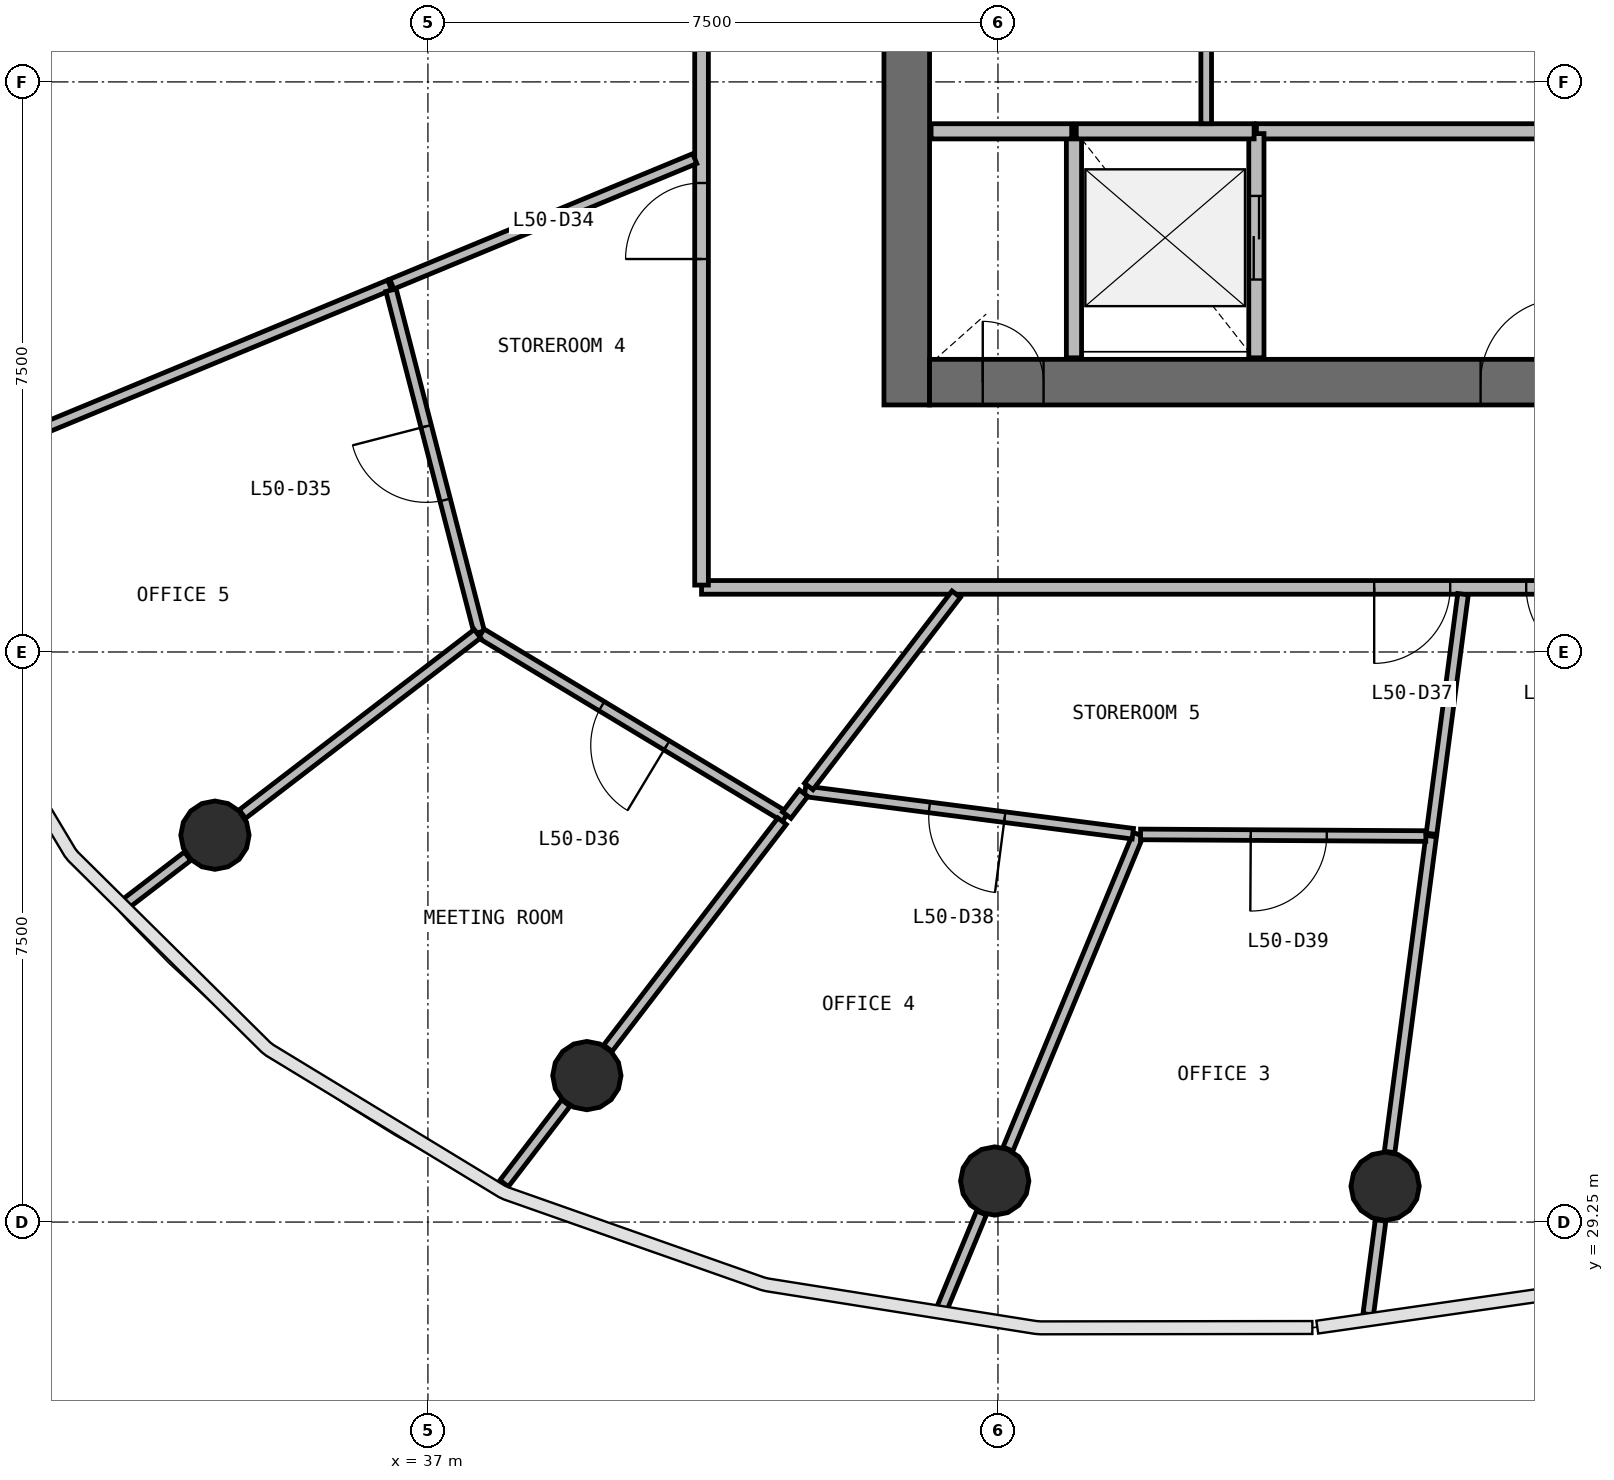
"""IFC4 building model, lengths in metres.
Left out: names, types, materials, properties, quantities, classifications, styles, units other than length and angle.
Written with IfcOpenShell. Run it as: python <this file> out.ifc"""

import sys

from ifc_helpers import new_model, si_unit, direction, frame, frame_2d, origin, origin_2d, place, context, subcontext, project, spatial, rectangle, circle, extrude, source, transform, mapped, element, fill, save


model = new_model("IFC4")
c1 = context("Model", 3, precision=1e-05, world=origin(), true_north=direction((0.0, 1.0)))
c2 = subcontext(c1, "Body", "Model", "MODEL_VIEW")
j1 = project(units=[si_unit("LENGTHUNIT", "METRE"), si_unit("PLANEANGLEUNIT", "RADIAN")], contexts=[c1])
p1 = place(None, origin())
s1 = spatial("IfcSite", under=j1, at=p1, CompositionType="ELEMENT")
p2 = place(p1, origin())
s2 = spatial("IfcBuilding", under=s1, at=p2, CompositionType="ELEMENT")
p3 = place(p2, frame((0.0, 0.0, 207.2)))
s3 = spatial("IfcBuildingStorey", under=s2, at=p3, CompositionType="ELEMENT", Elevation=207.2)
p4 = place(p3, frame((43.3, 56.0, 0.0), z_axis=(0.0, 0.0, 1.0), x_axis=(0.0, -1.0, 0.0)))
e1 = element("IfcWall", 1, at=p4, inside=s3, PredefinedType="SHEAR", context=c2, shape_type="SweptSolid", body=[
    extrude(rectangle(XDim=16.0, YDim=0.6, at=frame_2d((8.0, 0.0))), origin(), (0.0, 0.0, 1.0), 3.9),
])
p5 = place(p4, frame((7.1, 0.0, 0.0)))
e2 = element("IfcOpeningElement", 2, at=p5, cuts=e1, PredefinedType="OPENING", context=c2, shape_type="SweptSolid", body=[
    extrude(rectangle(XDim=1.8, YDim=2.1, at=frame_2d((0.9, 1.05))), frame((0.0, 0.31, 0.0), z_axis=(0.0, -1.0, 0.0), x_axis=(1.0, 0.0, 0.0)), (0.0, 0.0, 1.0), 0.62),
])
p6 = place(p3, frame((43.6, 40.3, 0.0), z_axis=(0.0, 0.0, 1.0), x_axis=(1.0, 0.0, 0.0)))
e3 = element("IfcWall", 3, at=p6, inside=s3, PredefinedType="SHEAR", context=c2, shape_type="SweptSolid", body=[
    extrude(rectangle(XDim=16.8, YDim=0.6, at=frame_2d((8.4, 0.0))), origin(), (0.0, 0.0, 1.0), 3.9),
])
p7 = place(p6, frame((10.3, 0.0, 0.0)))
e4 = element("IfcOpeningElement", 4, at=p7, cuts=e3, PredefinedType="OPENING", context=c2, shape_type="SweptSolid", body=[
    extrude(rectangle(XDim=1.2, YDim=2.1, at=frame_2d((0.6, 1.05))), frame((0.0, 0.31, 0.0), z_axis=(0.0, -1.0, 0.0), x_axis=(1.0, 0.0, 0.0)), (0.0, 0.0, 1.0), 0.62),
])
p8 = place(p6, frame((7.25, 0.0, 0.0)))
e5 = element("IfcOpeningElement", 5, at=p8, cuts=e3, PredefinedType="OPENING", context=c2, shape_type="SweptSolid", body=[
    extrude(rectangle(XDim=1.1, YDim=2.1, at=frame_2d((0.55, 1.05))), frame((0.0, 0.31, 0.0), z_axis=(0.0, -1.0, 0.0), x_axis=(1.0, 0.0, 0.0)), (0.0, 0.0, 1.0), 0.62),
])
p9 = place(p6, frame((0.7, 0.0, 0.0)))
e6 = element("IfcOpeningElement", 6, at=p9, cuts=e3, PredefinedType="OPENING", context=c2, shape_type="SweptSolid", body=[
    extrude(rectangle(XDim=0.8, YDim=2.1, at=frame_2d((0.4, 1.05))), frame((0.0, 0.31, 0.0), z_axis=(0.0, -1.0, 0.0), x_axis=(1.0, 0.0, 0.0)), (0.0, 0.0, 1.0), 0.62),
])
m1 = source(origin(), c2, "Body", "SweptSolid", [
    extrude(circle(Radius=0.45, at=origin_2d()), origin(), (0.0, 0.0, 1.0), 3.9),
])
for number, where, z_axis, x_axis in (
    (7, (34.198, 34.34, 0.0), (0.0, 0.0, 1.0), (1.0, 0.0, 0.0)),
    (8, (39.091, 31.177, 0.0), (0.0, 0.0, 1.0), (1.0, 0.0, 0.0)),
    (9, (44.457, 29.79, 0.0), (0.0, 0.0, 1.0), (1.0, 0.0, 0.0)),
    (10, (49.594, 29.722, 0.0), (0.0, 0.0, 1.0), (1.0, 0.0, 0.0)),
):
    element("IfcColumn", number, at=place(p3, frame(where, z_axis=z_axis, x_axis=x_axis)), inside=s3, PredefinedType="COLUMN", context=c2, shape_type="MappedRepresentation", body=[
        mapped(m1, transform((0.0, 0.0, 0.0), scale=1.0)),
    ])
p10 = place(p3, frame((52.7, 43.6, 0.0), z_axis=(0.0, 0.0, 1.0), x_axis=(-1.0, 0.0, 0.0)))
e11 = element("IfcWall", 11, at=p10, inside=s3, PredefinedType="SOLIDWALL", context=c2, shape_type="SweptSolid", body=[
    extrude(rectangle(XDim=4.8, YDim=0.2, at=frame_2d((2.4, 0.0))), origin(), (0.0, 0.0, 1.0), 3.58),
])
p11 = place(p3, frame((45.5, 43.6, 0.0), z_axis=(0.0, 0.0, 1.0), x_axis=(0.0, -1.0, 0.0)))
e12 = element("IfcWall", 12, at=p11, inside=s3, PredefinedType="SOLIDWALL", context=c2, shape_type="SweptSolid", body=[
    extrude(rectangle(XDim=2.98, YDim=0.2, at=frame_2d((1.49, 0.0))), origin(), (0.0, 0.0, 1.0), 3.58),
])
p12 = place(p3, frame((47.9, 40.62, 0.0), z_axis=(0.0, 0.0, 1.0), x_axis=(0.0, 1.0, 0.0)))
e13 = element("IfcWall", 13, at=p12, inside=s3, PredefinedType="SOLIDWALL", context=c2, shape_type="SweptSolid", body=[
    extrude(rectangle(XDim=2.95, YDim=0.2, at=frame_2d((1.475, 0.0))), origin(), (0.0, 0.0, 1.0), 3.58),
])
p13 = place(p12, frame((1.03, 0.0, 0.0)))
e14 = element("IfcOpeningElement", 14, at=p13, cuts=e13, PredefinedType="OPENING", context=c2, shape_type="SweptSolid", body=[
    extrude(rectangle(XDim=1.1, YDim=2.1, at=frame_2d((0.55, 1.05))), frame((0.0, 0.11, 0.0), z_axis=(0.0, -1.0, 0.0), x_axis=(1.0, 0.0, 0.0)), (0.0, 0.0, 1.0), 0.22),
])
p14 = place(p3, frame((47.87, 43.6, 0.0), z_axis=(0.0, 0.0, 1.0), x_axis=(-1.0, 0.0, 0.0)))
e15 = element("IfcWall", 15, at=p14, inside=s3, PredefinedType="SOLIDWALL", context=c2, shape_type="SweptSolid", body=[
    extrude(rectangle(XDim=2.34, YDim=0.2, at=frame_2d((1.17, 0.0))), origin(), (0.0, 0.0, 1.0), 3.58),
])
p15 = place(p3, frame((45.47, 43.6, 0.0), z_axis=(0.0, 0.0, 1.0), x_axis=(-1.0, 0.0, 0.0)))
e16 = element("IfcWall", 16, at=p15, inside=s3, PredefinedType="SOLIDWALL", context=c2, shape_type="SweptSolid", body=[
    extrude(rectangle(XDim=1.85, YDim=0.2, at=frame_2d((0.925, 0.0))), origin(), (0.0, 0.0, 1.0), 3.58),
])
p16 = place(p3, frame((63.4, 37.6, 0.0), z_axis=(0.0, 0.0, 1.0), x_axis=(-1.0, 0.0, 0.0)))
e17 = element("IfcWall", 17, at=p16, inside=s3, PredefinedType="PARTITIONING", context=c2, shape_type="SweptSolid", body=[
    extrude(rectangle(XDim=22.8, YDim=0.18, at=frame_2d((11.4, 0.0))), origin(), (0.0, 0.0, 1.0), 2.88),
])
p17 = place(p16, frame((12.95, 0.0, 0.0)))
e18 = element("IfcOpeningElement", 18, at=p17, cuts=e17, PredefinedType="OPENING", context=c2, shape_type="SweptSolid", body=[
    extrude(rectangle(XDim=1.0, YDim=2.1, at=frame_2d((0.5, 1.05))), frame((0.0, 0.1, 0.0), z_axis=(0.0, -1.0, 0.0), x_axis=(1.0, 0.0, 0.0)), (0.0, 0.0, 1.0), 0.2),
])
p18 = place(p16, frame((10.95, 0.0, 0.0)))
e19 = element("IfcOpeningElement", 19, at=p18, cuts=e17, PredefinedType="OPENING", context=c2, shape_type="SweptSolid", body=[
    extrude(rectangle(XDim=1.0, YDim=2.1, at=frame_2d((0.5, 1.05))), frame((0.0, 0.1, 0.0), z_axis=(0.0, -1.0, 0.0), x_axis=(1.0, 0.0, 0.0)), (0.0, 0.0, 1.0), 0.2),
])
p19 = place(p16, frame((5.75, 0.0, 0.0)))
e20 = element("IfcOpeningElement", 20, at=p19, cuts=e17, PredefinedType="OPENING", context=c2, shape_type="SweptSolid", body=[
    extrude(rectangle(XDim=1.0, YDim=2.1, at=frame_2d((0.5, 1.05))), frame((0.0, 0.1, 0.0), z_axis=(0.0, -1.0, 0.0), x_axis=(1.0, 0.0, 0.0)), (0.0, 0.0, 1.0), 0.2),
])
p20 = place(p3, frame((40.6, 37.63, 0.0), z_axis=(0.0, 0.0, 1.0), x_axis=(0.0, 1.0, 0.0)))
e21 = element("IfcWall", 21, at=p20, inside=s3, PredefinedType="PARTITIONING", context=c2, shape_type="SweptSolid", body=[
    extrude(rectangle(XDim=20.74, YDim=0.18, at=frame_2d((10.37, 0.0))), origin(), (0.0, 0.0, 1.0), 2.88),
])
p21 = place(p20, frame((9.89, 0.0, 0.0)))
e22 = element("IfcOpeningElement", 22, at=p21, cuts=e21, PredefinedType="OPENING", context=c2, shape_type="SweptSolid", body=[
    extrude(rectangle(XDim=1.0, YDim=2.1, at=frame_2d((0.5, 1.05))), frame((0.0, 0.1, 0.0), z_axis=(0.0, -1.0, 0.0), x_axis=(1.0, 0.0, 0.0)), (0.0, 0.0, 1.0), 0.2),
])
p22 = place(p20, frame((4.29, 0.0, 0.0)))
e23 = element("IfcOpeningElement", 23, at=p22, cuts=e21, PredefinedType="OPENING", context=c2, shape_type="SweptSolid", body=[
    extrude(rectangle(XDim=1.0, YDim=2.1, at=frame_2d((0.5, 1.05))), frame((0.0, 0.1, 0.0), z_axis=(0.0, -1.0, 0.0), x_axis=(1.0, 0.0, 0.0)), (0.0, 0.0, 1.0), 0.2),
])
p23 = place(p3, frame((36.497, 41.578, 0.0), z_axis=(0.0, 0.0, 1.0), x_axis=(-0.923872241602, -0.382701033703, 0.0)))
e24 = element("IfcWall", 24, at=p23, inside=s3, PredefinedType="PARTITIONING", context=c2, shape_type="SweptSolid", body=[
    extrude(rectangle(XDim=5.227, YDim=0.14, at=frame_2d((2.614, 0.0))), origin(), (0.0, 0.0, 1.0), 2.88),
])
p24 = place(p3, frame((37.676, 37.009, 0.0), z_axis=(0.0, 0.0, 1.0), x_axis=(-0.249819251726, 0.968292487561, 0.0)))
e25 = element("IfcWall", 25, at=p24, inside=s3, PredefinedType="PARTITIONING", context=c2, shape_type="SweptSolid", body=[
    extrude(rectangle(XDim=4.649, YDim=0.14, at=frame_2d((2.324, 0.0))), origin(), (0.0, 0.0, 1.0), 2.88),
])
p25 = place(p24, frame((1.799, 0.0, 0.0)))
e26 = element("IfcOpeningElement", 26, at=p25, cuts=e25, PredefinedType="OPENING", context=c2, shape_type="SweptSolid", body=[
    extrude(rectangle(XDim=1.0, YDim=2.1, at=frame_2d((0.5, 1.05))), frame((0.0, 0.08, 0.0), z_axis=(0.0, -1.0, 0.0), x_axis=(1.0, 0.0, 0.0)), (0.0, 0.0, 1.0), 0.16),
])
p26 = place(p3, frame((41.702, 34.58, 0.0), z_axis=(0.0, 0.0, 1.0), x_axis=(-0.856310382511, 0.516461546298, 0.0)))
e27 = element("IfcWall", 27, at=p26, inside=s3, PredefinedType="PARTITIONING", context=c2, shape_type="SweptSolid", body=[
    extrude(rectangle(XDim=4.672, YDim=0.14, at=frame_2d((2.336, 0.0))), origin(), (0.0, 0.0, 1.0), 2.88),
])
p27 = place(p26, frame((1.823, 0.0, 0.0)))
e28 = element("IfcOpeningElement", 28, at=p27, cuts=e27, PredefinedType="OPENING", context=c2, shape_type="SweptSolid", body=[
    extrude(rectangle(XDim=1.0, YDim=2.1, at=frame_2d((0.5, 1.05))), frame((0.0, 0.08, 0.0), z_axis=(0.0, -1.0, 0.0), x_axis=(1.0, 0.0, 0.0)), (0.0, 0.0, 1.0), 0.16),
])
p28 = place(p3, frame((46.346, 34.35, 0.0), z_axis=(0.0, 0.0, 1.0), x_axis=(-0.382683853281, -0.923879358162, 0.0)))
e29 = element("IfcWall", 29, at=p28, inside=s3, PredefinedType="PARTITIONING", context=c2, shape_type="SweptSolid", body=[
    extrude(rectangle(XDim=4.48, YDim=0.14, at=frame_2d((2.24, 0.0))), origin(), (0.0, 0.0, 1.0), 2.88),
])
p29 = place(p3, frame((40.51, 43.241, 0.0), z_axis=(0.0, 0.0, 1.0), x_axis=(-0.923880260939, -0.382681673781, 0.0)))
e30 = element("IfcWall", 30, at=p29, inside=s3, PredefinedType="PARTITIONING", context=c2, shape_type="SweptSolid", body=[
    extrude(rectangle(XDim=4.314, YDim=0.14, at=frame_2d((2.157, 0.0))), origin(), (0.0, 0.0, 1.0), 2.88),
])
p30 = place(p3, frame((46.274, 34.359, 0.0), z_axis=(0.0, 0.0, 1.0), x_axis=(-0.991745657541, 0.128220711073, 0.0)))
e31 = element("IfcWall", 31, at=p30, inside=s3, PredefinedType="PARTITIONING", context=c2, shape_type="SweptSolid", body=[
    extrude(rectangle(XDim=4.349, YDim=0.14, at=frame_2d((2.174, 0.0))), origin(), (0.0, 0.0, 1.0), 2.88),
])
p31 = place(p30, frame((1.699, 0.0, 0.0)))
e32 = element("IfcOpeningElement", 32, at=p31, cuts=e31, PredefinedType="OPENING", context=c2, shape_type="SweptSolid", body=[
    extrude(rectangle(XDim=1.0, YDim=2.1, at=frame_2d((0.5, 1.05))), frame((0.0, 0.08, 0.0), z_axis=(0.0, -1.0, 0.0), x_axis=(1.0, 0.0, 0.0)), (0.0, 0.0, 1.0), 0.16),
])
p32 = place(p3, frame((50.2, 34.328, 0.0), z_axis=(0.0, 0.0, 1.0), x_axis=(-0.130534370564, -0.99144378464, 0.0)))
e33 = element("IfcWall", 33, at=p32, inside=s3, PredefinedType="PARTITIONING", context=c2, shape_type="SweptSolid", body=[
    extrude(rectangle(XDim=4.191, YDim=0.14, at=frame_2d((2.096, 0.0))), origin(), (0.0, 0.0, 1.0), 2.88),
])
p33 = place(p3, frame((37.652, 36.99, 0.0), z_axis=(0.0, 0.0, 1.0), x_axis=(-0.793347300472, -0.608769300173, 0.0)))
e34 = element("IfcWall", 34, at=p33, inside=s3, PredefinedType="PARTITIONING", context=c2, shape_type="SweptSolid", body=[
    extrude(rectangle(XDim=3.899, YDim=0.14, at=frame_2d((1.95, 0.0))), origin(), (0.0, 0.0, 1.0), 2.88),
])
p34 = place(p3, frame((50.129, 34.328, 0.0), z_axis=(0.0, 0.0, 1.0), x_axis=(-0.999983244193, 0.005788897407, 0.0)))
e35 = element("IfcWall", 35, at=p34, inside=s3, PredefinedType="PARTITIONING", context=c2, shape_type="SweptSolid", body=[
    extrude(rectangle(XDim=3.753, YDim=0.14, at=frame_2d((1.877, 0.0))), origin(), (0.0, 0.0, 1.0), 2.88),
])
p35 = place(p34, frame((1.303, 0.0, 0.0)))
e36 = element("IfcOpeningElement", 36, at=p35, cuts=e35, PredefinedType="OPENING", context=c2, shape_type="SweptSolid", body=[
    extrude(rectangle(XDim=1.0, YDim=2.1, at=frame_2d((0.5, 1.05))), frame((0.0, 0.08, 0.0), z_axis=(0.0, -1.0, 0.0), x_axis=(1.0, 0.0, 0.0)), (0.0, 0.0, 1.0), 0.16),
])
p36 = place(p3, frame((41.66, 34.524, 0.0), z_axis=(0.0, 0.0, 1.0), x_axis=(-0.60877322383, -0.793344289667, 0.0)))
e37 = element("IfcWall", 37, at=p36, inside=s3, PredefinedType="PARTITIONING", context=c2, shape_type="SweptSolid", body=[
    extrude(rectangle(XDim=3.765, YDim=0.14, at=frame_2d((1.882, 0.0))), origin(), (0.0, 0.0, 1.0), 2.88),
])
p37 = place(p3, frame((41.943, 34.893, 0.0), z_axis=(0.0, 0.0, 1.0), x_axis=(-0.608740457709, -0.793369431695, 0.0)))
e38 = element("IfcWall", 38, at=p37, inside=s3, PredefinedType="PARTITIONING", context=c2, shape_type="SweptSolid", body=[
    extrude(rectangle(XDim=0.365, YDim=0.14, at=frame_2d((0.183, 0.0))), origin(), (0.0, 0.0, 1.0), 2.88),
])
p38 = place(p3, frame((43.951, 37.51, 0.0), z_axis=(0.0, 0.0, 1.0), x_axis=(-0.60871452172, -0.793389331317, 0.0)))
e39 = element("IfcWall", 39, at=p38, inside=s3, PredefinedType="PARTITIONING", context=c2, shape_type="SweptSolid", body=[
    extrude(rectangle(XDim=3.187, YDim=0.14, at=frame_2d((1.594, 0.0))), origin(), (0.0, 0.0, 1.0), 2.88),
])
p39 = place(p3, frame((50.619, 37.51, 0.0), z_axis=(0.0, 0.0, 1.0), x_axis=(-0.130524026108, -0.991445146546, 0.0)))
e40 = element("IfcWall", 40, at=p39, inside=s3, PredefinedType="PARTITIONING", context=c2, shape_type="SweptSolid", body=[
    extrude(rectangle(XDim=3.18, YDim=0.14, at=frame_2d((1.59, 0.0))), origin(), (0.0, 0.0, 1.0), 2.88),
])
p40 = place(p3, frame((47.24, 43.7, 0.0), z_axis=(0.0, 0.0, 1.0), x_axis=(0.0, 1.0, 0.0)))
e41 = element("IfcWall", 41, at=p40, inside=s3, PredefinedType="PARTITIONING", context=c2, shape_type="SweptSolid", body=[
    extrude(rectangle(XDim=2.29, YDim=0.14, at=frame_2d((1.145, 0.0))), origin(), (0.0, 0.0, 1.0), 2.88),
])
p41 = place(p3, frame((44.283, 29.37, 0.0), z_axis=(0.0, 0.0, 1.0), x_axis=(-0.382733825207, -0.923858657502, 0.0)))
e42 = element("IfcWall", 42, at=p41, inside=s3, PredefinedType="PARTITIONING", context=c2, shape_type="SweptSolid", body=[
    extrude(rectangle(XDim=1.373, YDim=0.14, at=frame_2d((0.687, 0.0))), origin(), (0.0, 0.0, 1.0), 2.88),
])
p42 = place(p3, frame((38.814, 30.816, 0.0), z_axis=(0.0, 0.0, 1.0), x_axis=(-0.608692849826, -0.79340595824, 0.0)))
e43 = element("IfcWall", 43, at=p42, inside=s3, PredefinedType="PARTITIONING", context=c2, shape_type="SweptSolid", body=[
    extrude(rectangle(XDim=1.334, YDim=0.14, at=frame_2d((0.667, 0.0))), origin(), (0.0, 0.0, 1.0), 2.88),
])
p43 = place(p3, frame((49.534, 29.271, 0.0), z_axis=(0.0, 0.0, 1.0), x_axis=(-0.130520415919, -0.991445621821, 0.0)))
e44 = element("IfcWall", 44, at=p43, inside=s3, PredefinedType="PARTITIONING", context=c2, shape_type="SweptSolid", body=[
    extrude(rectangle(XDim=1.246, YDim=0.14, at=frame_2d((0.623, 0.0))), origin(), (0.0, 0.0, 1.0), 2.88),
])
p44 = place(p3, frame((33.837, 34.063, 0.0), z_axis=(0.0, 0.0, 1.0), x_axis=(-0.793403619358, -0.608695898449, 0.0)))
e45 = element("IfcWall", 45, at=p44, inside=s3, PredefinedType="PARTITIONING", context=c2, shape_type="SweptSolid", body=[
    extrude(rectangle(XDim=1.047, YDim=0.14, at=frame_2d((0.523, 0.0))), origin(), (0.0, 0.0, 1.0), 2.88),
])
m2 = source(origin(), c2, "Body", "SweptSolid", [
    extrude(rectangle(XDim=1.1, YDim=2.1, at=frame_2d((0.55, 1.05))), frame((0.0, 0.025, 0.0), z_axis=(0.0, -1.0, 0.0), x_axis=(1.0, 0.0, 0.0)), (0.0, 0.0, 1.0), 0.05),
])
p45 = place(p13, origin())
e46 = element("IfcDoor", 46, at=p45, inside=s3, OperationType="DOUBLE_DOOR_SLIDING", PredefinedType="USERDEFINED", context=c2, shape_type="MappedRepresentation", body=[
    mapped(m2, transform((0.0, 0.0, 0.0), scale=1.0)),
])
fill(e14, e46)
m3 = source(origin(), c2, "Body", "SweptSolid", [
    extrude(rectangle(XDim=1.1, YDim=2.1, at=frame_2d((0.55, 1.05))), frame((0.0, 0.025, 0.0), z_axis=(0.0, -1.0, 0.0), x_axis=(1.0, 0.0, 0.0)), (0.0, 0.0, 1.0), 0.05),
])
p46 = place(p8, origin())
e47 = element("IfcDoor", 47, at=p46, inside=s3, OperationType="SINGLE_SWING_RIGHT", PredefinedType="DOOR", context=c2, shape_type="MappedRepresentation", body=[
    mapped(m3, transform((0.0, 0.0, 0.0), scale=1.0)),
])
fill(e5, e47)
m4 = source(origin(), c2, "Body", "SweptSolid", [
    extrude(rectangle(XDim=0.8, YDim=2.1, at=frame_2d((0.4, 1.05))), frame((0.0, 0.025, 0.0), z_axis=(0.0, -1.0, 0.0), x_axis=(1.0, 0.0, 0.0)), (0.0, 0.0, 1.0), 0.05),
])
p47 = place(p9, origin())
e48 = element("IfcDoor", 48, at=p47, inside=s3, OperationType="SINGLE_SWING_LEFT", PredefinedType="DOOR", context=c2, shape_type="MappedRepresentation", body=[
    mapped(m4, transform((0.0, 0.0, 0.0), scale=1.0)),
])
fill(e6, e48)
m5 = source(origin(), c2, "Body", "SweptSolid", [
    extrude(rectangle(XDim=1.0, YDim=2.1, at=frame_2d((0.5, 1.05))), frame((0.0, 0.025, 0.0), z_axis=(0.0, -1.0, 0.0), x_axis=(1.0, 0.0, 0.0)), (0.0, 0.0, 1.0), 0.05),
])
p48 = place(p22, origin())
e49 = element("IfcDoor", 49, at=p48, inside=s3, OperationType="SINGLE_SWING_LEFT", PredefinedType="DOOR", context=c2, shape_type="MappedRepresentation", body=[
    mapped(m5, transform((0.0, 0.0, 0.0), scale=1.0)),
])
fill(e23, e49)
p49 = place(p25, origin())
e50 = element("IfcDoor", 50, at=p49, inside=s3, OperationType="SINGLE_SWING_RIGHT", PredefinedType="DOOR", context=c2, shape_type="MappedRepresentation", body=[
    mapped(m5, transform((0.0, 0.0, 0.0), scale=1.0)),
])
fill(e26, e50)
p50 = place(p27, origin())
e51 = element("IfcDoor", 51, at=p50, inside=s3, OperationType="SINGLE_SWING_LEFT", PredefinedType="DOOR", context=c2, shape_type="MappedRepresentation", body=[
    mapped(m5, transform((0.0, 0.0, 0.0), scale=1.0)),
])
fill(e28, e51)
p51 = place(p17, origin())
e52 = element("IfcDoor", 52, at=p51, inside=s3, OperationType="SINGLE_SWING_RIGHT", PredefinedType="DOOR", context=c2, shape_type="MappedRepresentation", body=[
    mapped(m5, transform((0.0, 0.0, 0.0), scale=1.0)),
])
fill(e18, e52)
p52 = place(p31, origin())
e53 = element("IfcDoor", 53, at=p52, inside=s3, OperationType="SINGLE_SWING_LEFT", PredefinedType="DOOR", context=c2, shape_type="MappedRepresentation", body=[
    mapped(m5, transform((0.0, 0.0, 0.0), scale=1.0)),
])
fill(e32, e53)
p53 = place(p35, origin())
e54 = element("IfcDoor", 54, at=p53, inside=s3, OperationType="SINGLE_SWING_RIGHT", PredefinedType="DOOR", context=c2, shape_type="MappedRepresentation", body=[
    mapped(m5, transform((0.0, 0.0, 0.0), scale=1.0)),
])
fill(e36, e54)
p54 = place(p18, origin())
e55 = element("IfcDoor", 55, at=p54, inside=s3, OperationType="SINGLE_SWING_LEFT", PredefinedType="DOOR", context=c2, shape_type="MappedRepresentation", body=[
    mapped(m5, transform((0.0, 0.0, 0.0), scale=1.0)),
])
fill(e19, e55)
save(model, sys.argv[1])
